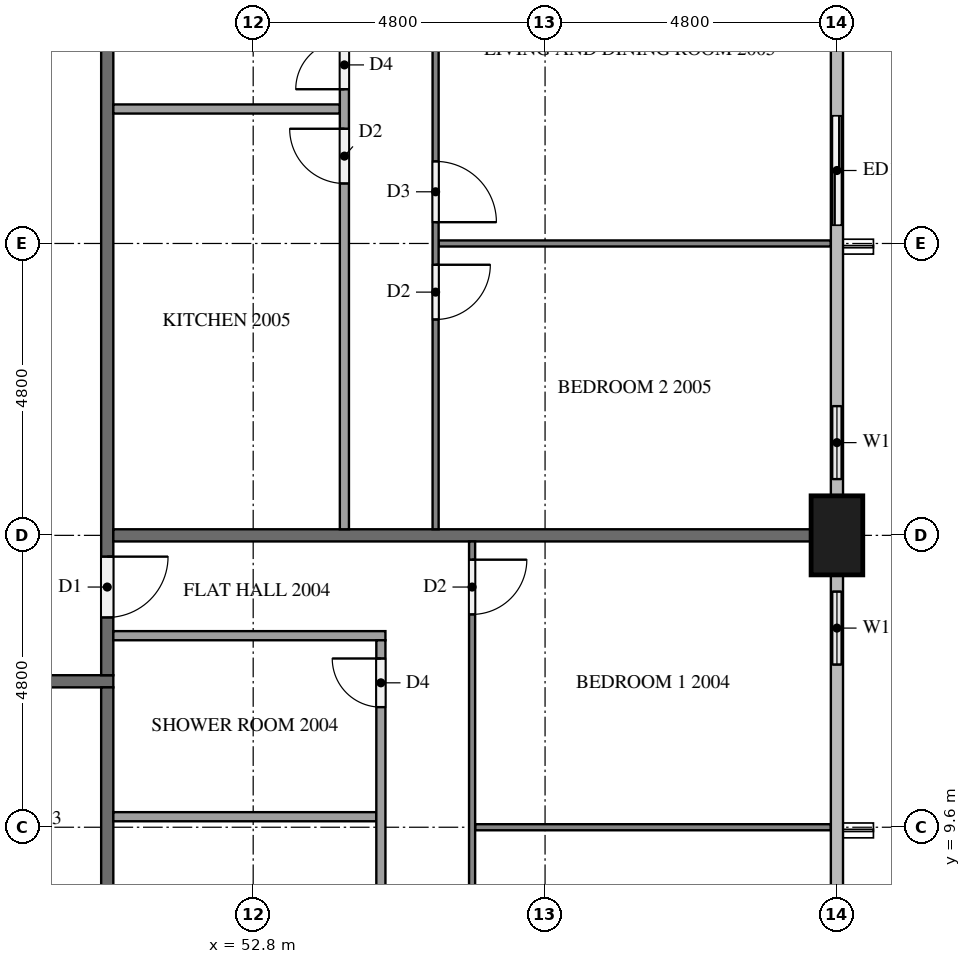
"""IFC4 building model, lengths in metres.
Left out: names, types, materials, properties, quantities, classifications, styles, units other than length and angle.
Written with IfcOpenShell. Run it as: python <this file> out.ifc"""

import sys

from ifc_helpers import new_model, si_unit, direction, frame, frame_2d, origin, origin_2d, place, context, subcontext, project, spatial, rectangle, extrude, element, fill, save


model = new_model("IFC4")
c1 = context("Model", 3, precision=1e-05, world=origin(), true_north=direction((0.0, 1.0)))
c2 = subcontext(c1, "Body", "Model", "MODEL_VIEW")
j1 = project(units=[si_unit("LENGTHUNIT", "METRE"), si_unit("PLANEANGLEUNIT", "RADIAN")], contexts=[c1])
p1 = place(None, origin())
s1 = spatial("IfcSite", under=j1, at=p1, CompositionType="ELEMENT")
p2 = place(p1, origin())
s2 = spatial("IfcBuilding", under=s1, at=p2, CompositionType="ELEMENT")
p3 = place(p2, frame((0.0, 0.0, 80.3)))
s3 = spatial("IfcBuildingStorey", under=s2, at=p3, CompositionType="ELEMENT", Elevation=80.3)
p4 = place(p3, frame((62.4, 14.4, 0.0), z_axis=(0.0, 0.0, 1.0), x_axis=(0.0, 1.0, 0.0)))
e1 = element("IfcColumn", 1, at=p4, inside=s3, PredefinedType="COLUMN", context=c2, shape_type="SweptSolid", body=[
    extrude(rectangle(XDim=1.3, YDim=0.85, at=origin_2d()), origin(), (0.0, 0.0, 1.0), 3.1),
])
p5 = place(p3, frame((62.4, 12.0, 0.0), z_axis=(0.0, 0.0, 1.0), x_axis=(0.0, 1.0, 0.0)))
e2 = element("IfcWall", 2, at=p5, inside=s3, PredefinedType="SOLIDWALL", context=c2, shape_type="SweptSolid", body=[
    extrude(rectangle(XDim=1.75, YDim=0.15, at=frame_2d((0.875, 0.0))), origin(), (0.0, 0.0, 1.0), 3.1),
])
p6 = place(p5, frame((0.275, 0.0, 0.9)))
e3 = element("IfcOpeningElement", 3, at=p6, cuts=e2, PredefinedType="OPENING", context=c2, shape_type="SweptSolid", body=[
    extrude(rectangle(XDim=1.2, YDim=1.4, at=frame_2d((0.6, 0.7))), frame((0.0, 0.085, 0.0), z_axis=(0.0, -1.0, 0.0), x_axis=(1.0, 0.0, 0.0)), (0.0, 0.0, 1.0), 0.17),
])
p7 = place(p3, frame((62.4, 15.05, 0.0), z_axis=(0.0, 0.0, 1.0), x_axis=(0.0, 1.0, 0.0)))
e4 = element("IfcWall", 4, at=p7, inside=s3, PredefinedType="SOLIDWALL", context=c2, shape_type="SweptSolid", body=[
    extrude(rectangle(XDim=1.75, YDim=0.15, at=frame_2d((0.875, 0.0))), origin(), (0.0, 0.0, 1.0), 3.1),
])
p8 = place(p7, frame((0.275, 0.0, 0.9)))
e5 = element("IfcOpeningElement", 5, at=p8, cuts=e4, PredefinedType="OPENING", context=c2, shape_type="SweptSolid", body=[
    extrude(rectangle(XDim=1.2, YDim=1.4, at=frame_2d((0.6, 0.7))), frame((0.0, 0.085, 0.0), z_axis=(0.0, -1.0, 0.0), x_axis=(1.0, 0.0, 0.0)), (0.0, 0.0, 1.0), 0.17),
])
p9 = place(p3, frame((62.4, 19.2, 0.0), z_axis=(0.0, 0.0, 1.0), x_axis=(0.0, 1.0, 0.0)))
e6 = element("IfcWall", 6, at=p9, inside=s3, PredefinedType="SOLIDWALL", context=c2, shape_type="SweptSolid", body=[
    extrude(rectangle(XDim=2.4, YDim=0.15, at=frame_2d((1.2, 0.0))), origin(), (0.0, 0.0, 1.0), 3.1),
])
p10 = place(p9, frame((0.3, 0.0, 0.0)))
e7 = element("IfcOpeningElement", 7, at=p10, cuts=e6, PredefinedType="OPENING", context=c2, shape_type="SweptSolid", body=[
    extrude(rectangle(XDim=1.8, YDim=2.4, at=frame_2d((0.9, 1.2))), frame((0.0, 0.085, 0.0), z_axis=(0.0, -1.0, 0.0), x_axis=(1.0, 0.0, 0.0)), (0.0, 0.0, 1.0), 0.17),
])
p11 = place(p3, frame((50.5, 12.0, 0.0), z_axis=(0.0, 0.0, 1.0), x_axis=(-1.0, 0.0, 0.0)))
e8 = element("IfcWall", 8, at=p11, inside=s3, PredefinedType="PARTITIONING", context=c2, shape_type="SweptSolid", body=[
    extrude(rectangle(XDim=38.6, YDim=0.2, at=frame_2d((19.3, 0.0))), origin(), (0.0, 0.0, 1.0), 3.1),
])
p12 = place(p11, frame((31.65, 0.0, 0.0)))
e9 = element("IfcOpeningElement", 9, at=p12, cuts=e8, PredefinedType="OPENING", context=c2, shape_type="SweptSolid", body=[
    extrude(rectangle(XDim=1.0, YDim=2.1, at=frame_2d((0.5, 1.05))), frame((0.0, 0.11, 0.0), z_axis=(0.0, -1.0, 0.0), x_axis=(1.0, 0.0, 0.0)), (0.0, 0.0, 1.0), 0.22),
])
p13 = place(p11, frame((14.85, 0.0, 0.0)))
e10 = element("IfcOpeningElement", 10, at=p13, cuts=e8, PredefinedType="OPENING", context=c2, shape_type="SweptSolid", body=[
    extrude(rectangle(XDim=1.0, YDim=2.1, at=frame_2d((0.5, 1.05))), frame((0.0, 0.11, 0.0), z_axis=(0.0, -1.0, 0.0), x_axis=(1.0, 0.0, 0.0)), (0.0, 0.0, 1.0), 0.22),
])
p14 = place(p11, frame((13.15, 0.0, 0.0)))
e11 = element("IfcOpeningElement", 11, at=p14, cuts=e8, PredefinedType="OPENING", context=c2, shape_type="SweptSolid", body=[
    extrude(rectangle(XDim=1.0, YDim=2.1, at=frame_2d((0.5, 1.05))), frame((0.0, 0.11, 0.0), z_axis=(0.0, -1.0, 0.0), x_axis=(1.0, 0.0, 0.0)), (0.0, 0.0, 1.0), 0.22),
])
p15 = place(p3, frame((50.4, 40.7, 0.0), z_axis=(0.0, 0.0, 1.0), x_axis=(0.0, -1.0, 0.0)))
e12 = element("IfcWall", 12, at=p15, inside=s3, PredefinedType="PARTITIONING", context=c2, shape_type="SweptSolid", body=[
    extrude(rectangle(XDim=28.6, YDim=0.2, at=frame_2d((14.3, 0.0))), origin(), (0.0, 0.0, 1.0), 3.1),
])
p16 = place(p15, frame((26.65, 0.0, 0.0)))
e13 = element("IfcOpeningElement", 13, at=p16, cuts=e12, PredefinedType="OPENING", context=c2, shape_type="SweptSolid", body=[
    extrude(rectangle(XDim=1.0, YDim=2.1, at=frame_2d((0.5, 1.05))), frame((0.0, 0.11, 0.0), z_axis=(0.0, -1.0, 0.0), x_axis=(1.0, 0.0, 0.0)), (0.0, 0.0, 1.0), 0.22),
])
p17 = place(p15, frame((9.85, 0.0, 0.0)))
e14 = element("IfcOpeningElement", 14, at=p17, cuts=e12, PredefinedType="OPENING", context=c2, shape_type="SweptSolid", body=[
    extrude(rectangle(XDim=1.0, YDim=2.1, at=frame_2d((0.5, 1.05))), frame((0.0, 0.11, 0.0), z_axis=(0.0, -1.0, 0.0), x_axis=(1.0, 0.0, 0.0)), (0.0, 0.0, 1.0), 0.22),
])
p18 = place(p15, frame((2.65, 0.0, 0.0)))
e15 = element("IfcOpeningElement", 15, at=p18, cuts=e12, PredefinedType="OPENING", context=c2, shape_type="SweptSolid", body=[
    extrude(rectangle(XDim=1.0, YDim=2.1, at=frame_2d((0.5, 1.05))), frame((0.0, 0.11, 0.0), z_axis=(0.0, -1.0, 0.0), x_axis=(1.0, 0.0, 0.0)), (0.0, 0.0, 1.0), 0.22),
])
p19 = place(p15, frame((0.95, 0.0, 0.0)))
e16 = element("IfcOpeningElement", 16, at=p19, cuts=e12, PredefinedType="OPENING", context=c2, shape_type="SweptSolid", body=[
    extrude(rectangle(XDim=1.0, YDim=2.1, at=frame_2d((0.5, 1.05))), frame((0.0, 0.11, 0.0), z_axis=(0.0, -1.0, 0.0), x_axis=(1.0, 0.0, 0.0)), (0.0, 0.0, 1.0), 0.22),
])
p20 = place(p3, frame((50.4, 11.9, 0.0), z_axis=(0.0, 0.0, 1.0), x_axis=(0.0, -1.0, 0.0)))
e17 = element("IfcWall", 17, at=p20, inside=s3, PredefinedType="PARTITIONING", context=c2, shape_type="SweptSolid", body=[
    extrude(rectangle(XDim=11.8, YDim=0.2, at=frame_2d((5.9, 0.0))), origin(), (0.0, 0.0, 1.0), 3.1),
])
p21 = place(p3, frame((50.5, 14.4, 0.0), z_axis=(0.0, 0.0, 1.0), x_axis=(1.0, 0.0, 0.0)))
e18 = element("IfcWall", 18, at=p21, inside=s3, PredefinedType="PARTITIONING", context=c2, shape_type="SweptSolid", body=[
    extrude(rectangle(XDim=11.475, YDim=0.2, at=frame_2d((5.738, 0.0))), origin(), (0.0, 0.0, 1.0), 3.1),
])
p22 = place(p3, frame((56.45, 9.6, 0.0), z_axis=(0.0, 0.0, 1.0), x_axis=(1.0, 0.0, 0.0)))
e19 = element("IfcWall", 19, at=p22, inside=s3, PredefinedType="PARTITIONING", context=c2, shape_type="SweptSolid", body=[
    extrude(rectangle(XDim=5.85, YDim=0.1, at=frame_2d((2.925, 0.0))), origin(), (0.0, 0.0, 1.0), 3.1),
])
p23 = place(p3, frame((56.4, 14.3, 0.0), z_axis=(0.0, 0.0, 1.0), x_axis=(0.0, -1.0, 0.0)))
e20 = element("IfcWall", 20, at=p23, inside=s3, PredefinedType="PARTITIONING", context=c2, shape_type="SweptSolid", body=[
    extrude(rectangle(XDim=14.2, YDim=0.1, at=frame_2d((7.1, 0.0))), origin(), (0.0, 0.0, 1.0), 3.1),
])
p24 = place(p23, frame((0.3, 0.0, 0.0)))
e21 = element("IfcOpeningElement", 21, at=p24, cuts=e20, PredefinedType="OPENING", context=c2, shape_type="SweptSolid", body=[
    extrude(rectangle(XDim=0.9, YDim=2.1, at=frame_2d((0.45, 1.05))), frame((0.0, 0.06, 0.0), z_axis=(0.0, -1.0, 0.0), x_axis=(1.0, 0.0, 0.0)), (0.0, 0.0, 1.0), 0.12),
])
p25 = place(p23, frame((8.15, 0.0, 0.0)))
e22 = element("IfcOpeningElement", 22, at=p25, cuts=e20, PredefinedType="OPENING", context=c2, shape_type="SweptSolid", body=[
    extrude(rectangle(XDim=1.0, YDim=2.1, at=frame_2d((0.5, 1.05))), frame((0.0, 0.06, 0.0), z_axis=(0.0, -1.0, 0.0), x_axis=(1.0, 0.0, 0.0)), (0.0, 0.0, 1.0), 0.12),
])
p26 = place(p23, frame((9.85, 0.0, 0.0)))
e23 = element("IfcOpeningElement", 23, at=p26, cuts=e20, PredefinedType="OPENING", context=c2, shape_type="SweptSolid", body=[
    extrude(rectangle(XDim=0.9, YDim=2.1, at=frame_2d((0.45, 1.05))), frame((0.0, 0.06, 0.0), z_axis=(0.0, -1.0, 0.0), x_axis=(1.0, 0.0, 0.0)), (0.0, 0.0, 1.0), 0.12),
])
p27 = place(p3, frame((50.5, 9.773, 0.0), z_axis=(0.0, 0.0, 1.0), x_axis=(1.0, 0.0, 0.0)))
e24 = element("IfcWall", 24, at=p27, inside=s3, PredefinedType="PARTITIONING", context=c2, shape_type="SweptSolid", body=[
    extrude(rectangle(XDim=4.325, YDim=0.15, at=frame_2d((2.163, 0.0))), origin(), (0.0, 0.0, 1.0), 3.1),
])
p28 = place(p3, frame((50.5, 12.75, 0.0), z_axis=(0.0, 0.0, 1.0), x_axis=(1.0, 0.0, 0.0)))
e25 = element("IfcWall", 25, at=p28, inside=s3, PredefinedType="PARTITIONING", context=c2, shape_type="SweptSolid", body=[
    extrude(rectangle(XDim=4.475, YDim=0.15, at=frame_2d((2.238, 0.0))), origin(), (0.0, 0.0, 1.0), 3.1),
])
p29 = place(p3, frame((54.9, 0.1, 0.0), z_axis=(0.0, 0.0, 1.0), x_axis=(0.0, 1.0, 0.0)))
e26 = element("IfcWall", 26, at=p29, inside=s3, PredefinedType="PARTITIONING", context=c2, shape_type="SweptSolid", body=[
    extrude(rectangle(XDim=12.575, YDim=0.15, at=frame_2d((6.288, 0.0))), origin(), (0.0, 0.0, 1.0), 3.1),
])
p30 = place(p29, frame((11.475, 0.0, 0.0)))
e27 = element("IfcOpeningElement", 27, at=p30, cuts=e26, PredefinedType="OPENING", context=c2, shape_type="SweptSolid", body=[
    extrude(rectangle(XDim=0.8, YDim=2.1, at=frame_2d((0.4, 1.05))), frame((0.0, 0.085, 0.0), z_axis=(0.0, -1.0, 0.0), x_axis=(1.0, 0.0, 0.0)), (0.0, 0.0, 1.0), 0.17),
])
p31 = place(p29, frame((4.194, 0.0, 0.0)))
e28 = element("IfcOpeningElement", 28, at=p31, cuts=e26, PredefinedType="OPENING", context=c2, shape_type="SweptSolid", body=[
    extrude(rectangle(XDim=0.9, YDim=2.1, at=frame_2d((0.45, 1.05))), frame((0.0, 0.085, 0.0), z_axis=(0.0, -1.0, 0.0), x_axis=(1.0, 0.0, 0.0)), (0.0, 0.0, 1.0), 0.17),
])
p32 = place(p29, frame((2.644, 0.0, 0.0)))
e29 = element("IfcOpeningElement", 29, at=p32, cuts=e26, PredefinedType="OPENING", context=c2, shape_type="SweptSolid", body=[
    extrude(rectangle(XDim=0.9, YDim=2.1, at=frame_2d((0.45, 1.05))), frame((0.0, 0.085, 0.0), z_axis=(0.0, -1.0, 0.0), x_axis=(1.0, 0.0, 0.0)), (0.0, 0.0, 1.0), 0.17),
])
p33 = place(p3, frame((55.85, 19.2, 0.0), z_axis=(0.0, 0.0, 1.0), x_axis=(1.0, 0.0, 0.0)))
e30 = element("IfcWall", 30, at=p33, inside=s3, PredefinedType="PARTITIONING", context=c2, shape_type="SweptSolid", body=[
    extrude(rectangle(XDim=6.45, YDim=0.1, at=frame_2d((3.225, 0.0))), origin(), (0.0, 0.0, 1.0), 3.1),
])
p34 = place(p3, frame((55.8, 31.1, 0.0), z_axis=(0.0, 0.0, 1.0), x_axis=(0.0, -1.0, 0.0)))
e31 = element("IfcWall", 31, at=p34, inside=s3, PredefinedType="PARTITIONING", context=c2, shape_type="SweptSolid", body=[
    extrude(rectangle(XDim=16.6, YDim=0.1, at=frame_2d((8.3, 0.0))), origin(), (0.0, 0.0, 1.0), 3.1),
])
p35 = place(p34, frame((0.3, 0.0, 0.0)))
e32 = element("IfcOpeningElement", 32, at=p35, cuts=e31, PredefinedType="OPENING", context=c2, shape_type="SweptSolid", body=[
    extrude(rectangle(XDim=0.9, YDim=2.1, at=frame_2d((0.45, 1.05))), frame((0.0, 0.06, 0.0), z_axis=(0.0, -1.0, 0.0), x_axis=(1.0, 0.0, 0.0)), (0.0, 0.0, 1.0), 0.12),
])
p36 = place(p34, frame((10.55, 0.0, 0.0)))
e33 = element("IfcOpeningElement", 33, at=p36, cuts=e31, PredefinedType="OPENING", context=c2, shape_type="SweptSolid", body=[
    extrude(rectangle(XDim=1.0, YDim=2.1, at=frame_2d((0.5, 1.05))), frame((0.0, 0.06, 0.0), z_axis=(0.0, -1.0, 0.0), x_axis=(1.0, 0.0, 0.0)), (0.0, 0.0, 1.0), 0.12),
])
p37 = place(p34, frame((12.25, 0.0, 0.0)))
e34 = element("IfcOpeningElement", 34, at=p37, cuts=e31, PredefinedType="OPENING", context=c2, shape_type="SweptSolid", body=[
    extrude(rectangle(XDim=0.9, YDim=2.1, at=frame_2d((0.45, 1.05))), frame((0.0, 0.06, 0.0), z_axis=(0.0, -1.0, 0.0), x_axis=(1.0, 0.0, 0.0)), (0.0, 0.0, 1.0), 0.12),
])
p38 = place(p3, frame((50.5, 21.412, 0.0), z_axis=(0.0, 0.0, 1.0), x_axis=(1.0, 0.0, 0.0)))
e35 = element("IfcWall", 35, at=p38, inside=s3, PredefinedType="PARTITIONING", context=c2, shape_type="SweptSolid", body=[
    extrude(rectangle(XDim=3.725, YDim=0.15, at=frame_2d((1.863, 0.0))), origin(), (0.0, 0.0, 1.0), 3.1),
])
p39 = place(p3, frame((54.3, 14.5, 0.0), z_axis=(0.0, 0.0, 1.0), x_axis=(0.0, 1.0, 0.0)))
e36 = element("IfcWall", 36, at=p39, inside=s3, PredefinedType="PARTITIONING", context=c2, shape_type="SweptSolid", body=[
    extrude(rectangle(XDim=14.975, YDim=0.15, at=frame_2d((7.488, 0.0))), origin(), (0.0, 0.0, 1.0), 3.1),
])
p40 = place(p39, frame((13.775, 0.0, 0.0)))
e37 = element("IfcOpeningElement", 37, at=p40, cuts=e36, PredefinedType="OPENING", context=c2, shape_type="SweptSolid", body=[
    extrude(rectangle(XDim=0.9, YDim=2.1, at=frame_2d((0.45, 1.05))), frame((0.0, 0.085, 0.0), z_axis=(0.0, -1.0, 0.0), x_axis=(1.0, 0.0, 0.0)), (0.0, 0.0, 1.0), 0.17),
])
p41 = place(p39, frame((7.237, 0.0, 0.0)))
e38 = element("IfcOpeningElement", 38, at=p41, cuts=e36, PredefinedType="OPENING", context=c2, shape_type="SweptSolid", body=[
    extrude(rectangle(XDim=0.8, YDim=2.1, at=frame_2d((0.4, 1.05))), frame((0.0, 0.085, 0.0), z_axis=(0.0, -1.0, 0.0), x_axis=(1.0, 0.0, 0.0)), (0.0, 0.0, 1.0), 0.17),
])
p42 = place(p39, frame((5.687, 0.0, 0.0)))
e39 = element("IfcOpeningElement", 39, at=p42, cuts=e36, PredefinedType="OPENING", context=c2, shape_type="SweptSolid", body=[
    extrude(rectangle(XDim=0.9, YDim=2.1, at=frame_2d((0.45, 1.05))), frame((0.0, 0.085, 0.0), z_axis=(0.0, -1.0, 0.0), x_axis=(1.0, 0.0, 0.0)), (0.0, 0.0, 1.0), 0.17),
])
p43 = place(p6, origin())
e40 = element("IfcWindow", 40, at=p43, inside=s3, PartitioningType="SINGLE_PANEL", PredefinedType="WINDOW", context=c2, shape_type="SweptSolid", body=[
    extrude(rectangle(XDim=1.2, YDim=1.4, at=frame_2d((0.6, 0.7))), frame((0.0, 0.03, 0.0), z_axis=(0.0, -1.0, 0.0), x_axis=(1.0, 0.0, 0.0)), (0.0, 0.0, 1.0), 0.06),
])
fill(e3, e40)
p44 = place(p8, origin())
e41 = element("IfcWindow", 41, at=p44, inside=s3, PartitioningType="SINGLE_PANEL", PredefinedType="WINDOW", context=c2, shape_type="SweptSolid", body=[
    extrude(rectangle(XDim=1.2, YDim=1.4, at=frame_2d((0.6, 0.7))), frame((0.0, 0.03, 0.0), z_axis=(0.0, -1.0, 0.0), x_axis=(1.0, 0.0, 0.0)), (0.0, 0.0, 1.0), 0.06),
])
fill(e5, e41)
p45 = place(p10, origin())
e42 = element("IfcDoor", 42, at=p45, inside=s3, OperationType="SLIDING_TO_RIGHT", PredefinedType="DOOR", context=c2, shape_type="SweptSolid", body=[
    extrude(rectangle(XDim=1.8, YDim=2.4, at=frame_2d((0.9, 1.2))), frame((0.0, 0.025, 0.0), z_axis=(0.0, -1.0, 0.0), x_axis=(1.0, 0.0, 0.0)), (0.0, 0.0, 1.0), 0.05),
])
fill(e7, e42)
p46 = place(p16, origin())
e43 = element("IfcDoor", 43, at=p46, inside=s3, OperationType="SINGLE_SWING_LEFT", PredefinedType="DOOR", context=c2, shape_type="SweptSolid", body=[
    extrude(rectangle(XDim=1.0, YDim=2.1, at=frame_2d((0.5, 1.05))), frame((0.0, 0.025, 0.0), z_axis=(0.0, -1.0, 0.0), x_axis=(1.0, 0.0, 0.0)), (0.0, 0.0, 1.0), 0.05),
])
fill(e13, e43)
p47 = place(p24, origin())
e44 = element("IfcDoor", 44, at=p47, inside=s3, OperationType="SINGLE_SWING_LEFT", PredefinedType="DOOR", context=c2, shape_type="SweptSolid", body=[
    extrude(rectangle(XDim=0.9, YDim=2.1, at=frame_2d((0.45, 1.05))), frame((0.0, 0.025, 0.0), z_axis=(0.0, -1.0, 0.0), x_axis=(1.0, 0.0, 0.0)), (0.0, 0.0, 1.0), 0.05),
])
fill(e21, e44)
p48 = place(p30, origin())
e45 = element("IfcDoor", 45, at=p48, inside=s3, OperationType="SINGLE_SWING_RIGHT", PredefinedType="DOOR", context=c2, shape_type="SweptSolid", body=[
    extrude(rectangle(XDim=0.8, YDim=2.1, at=frame_2d((0.4, 1.05))), frame((0.0, 0.025, 0.0), z_axis=(0.0, -1.0, 0.0), x_axis=(1.0, 0.0, 0.0)), (0.0, 0.0, 1.0), 0.05),
])
fill(e27, e45)
p49 = place(p36, origin())
e46 = element("IfcDoor", 46, at=p49, inside=s3, OperationType="SINGLE_SWING_RIGHT", PredefinedType="DOOR", context=c2, shape_type="SweptSolid", body=[
    extrude(rectangle(XDim=1.0, YDim=2.1, at=frame_2d((0.5, 1.05))), frame((0.0, 0.025, 0.0), z_axis=(0.0, -1.0, 0.0), x_axis=(1.0, 0.0, 0.0)), (0.0, 0.0, 1.0), 0.05),
])
fill(e33, e46)
p50 = place(p37, origin())
e47 = element("IfcDoor", 47, at=p50, inside=s3, OperationType="SINGLE_SWING_LEFT", PredefinedType="DOOR", context=c2, shape_type="SweptSolid", body=[
    extrude(rectangle(XDim=0.9, YDim=2.1, at=frame_2d((0.45, 1.05))), frame((0.0, 0.025, 0.0), z_axis=(0.0, -1.0, 0.0), x_axis=(1.0, 0.0, 0.0)), (0.0, 0.0, 1.0), 0.05),
])
fill(e34, e47)
p51 = place(p41, origin())
e48 = element("IfcDoor", 48, at=p51, inside=s3, OperationType="SINGLE_SWING_LEFT", PredefinedType="DOOR", context=c2, shape_type="SweptSolid", body=[
    extrude(rectangle(XDim=0.8, YDim=2.1, at=frame_2d((0.4, 1.05))), frame((0.0, 0.025, 0.0), z_axis=(0.0, -1.0, 0.0), x_axis=(1.0, 0.0, 0.0)), (0.0, 0.0, 1.0), 0.05),
])
fill(e38, e48)
p52 = place(p42, origin())
e49 = element("IfcDoor", 49, at=p52, inside=s3, OperationType="SINGLE_SWING_RIGHT", PredefinedType="DOOR", context=c2, shape_type="SweptSolid", body=[
    extrude(rectangle(XDim=0.9, YDim=2.1, at=frame_2d((0.45, 1.05))), frame((0.0, 0.025, 0.0), z_axis=(0.0, -1.0, 0.0), x_axis=(1.0, 0.0, 0.0)), (0.0, 0.0, 1.0), 0.05),
])
fill(e39, e49)
save(model, sys.argv[1])
